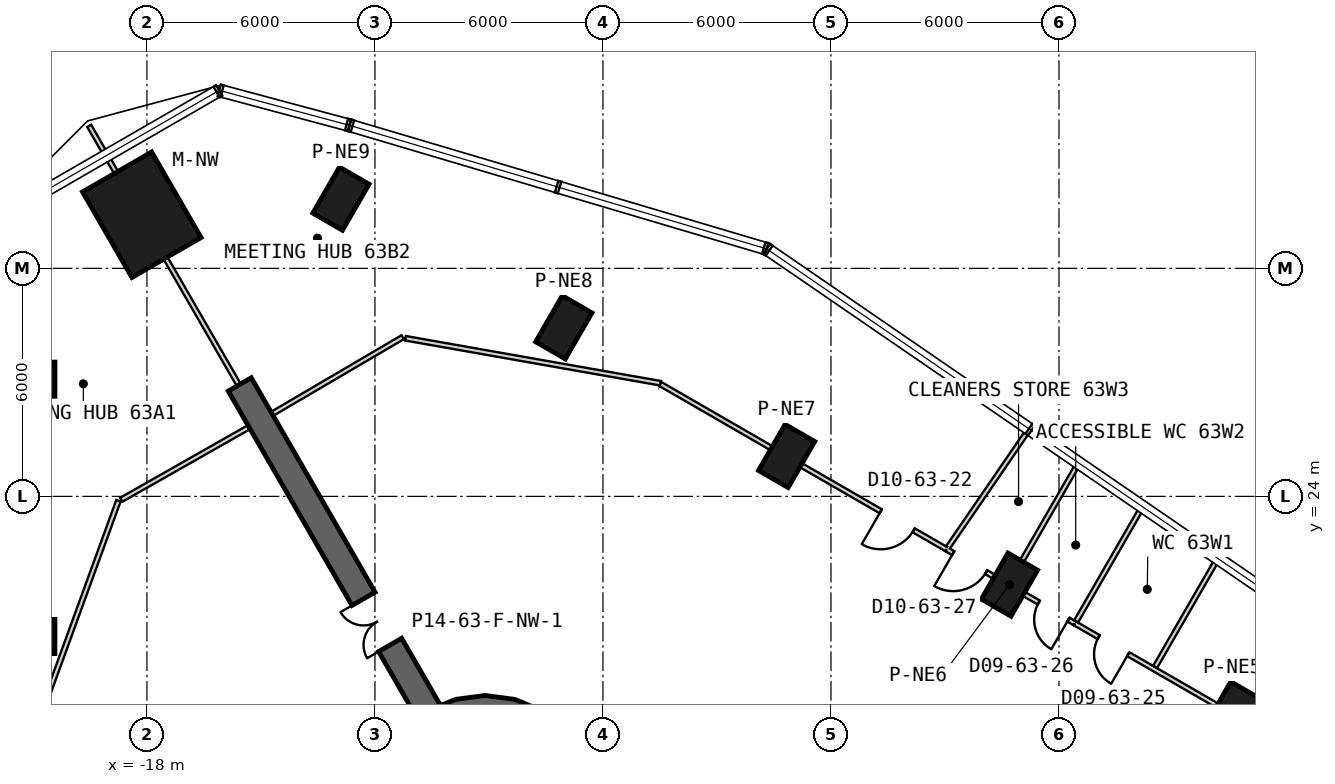
"""IFC4 building model, lengths in metres.
Left out: names, types, materials, properties, quantities, classifications, styles, units other than length and angle.
Written with IfcOpenShell. Run it as: python <this file> out.ifc"""

import sys

from ifc_helpers import new_model, si_unit, direction, frame, frame_2d, origin, origin_2d, place, context, subcontext, project, spatial, polyline, rectangle, outline, extrude, element, fill, save


model = new_model("IFC4")
c1 = context("Model", 3, precision=1e-05, world=origin(), true_north=direction((0.0, 1.0)))
c2 = subcontext(c1, "Body", "Model", "MODEL_VIEW")
j1 = project(units=[si_unit("LENGTHUNIT", "METRE"), si_unit("PLANEANGLEUNIT", "RADIAN")], contexts=[c1])
p1 = place(None, origin())
s1 = spatial("IfcSite", under=j1, at=p1, CompositionType="ELEMENT")
p2 = place(p1, origin())
s2 = spatial("IfcBuilding", under=s1, at=p2, CompositionType="ELEMENT")
p3 = place(p2, frame((0.0, 0.0, 277.2)))
s3 = spatial("IfcBuildingStorey", under=s2, at=p3, CompositionType="ELEMENT", Elevation=277.2)
p4 = place(p3, frame((-18.135, 31.411, 0.0), z_axis=(0.0, 0.0, 1.0), x_axis=(-0.5, 0.866025403784, 0.0)))
e1 = element("IfcColumn", 1, at=p4, inside=s3, PredefinedType="COLUMN", context=c2, shape_type="SweptSolid", body=[
    extrude(rectangle(XDim=2.6, YDim=2.1, at=origin_2d()), origin(), (0.0, 0.0, 1.0), 6.5),
])
for number, where, z_axis, x_axis in (
    (2, (-21.121, 27.084, 0.0), (0.0, 0.0, 1.0), (-1.0, 0.0, 0.0)),
    (3, (-21.121, 20.313, 0.0), (0.0, 0.0, 1.0), (-1.0, 0.0, 0.0)),
    (4, (10.561, 18.292, 0.0), (0.0, 0.0, 1.0), (0.5, 0.866, 0.0)),
    (5, (4.697, 21.677, 0.0), (0.0, 0.0, 1.0), (0.5, 0.866, 0.0)),
    (6, (-1.167, 25.063, 0.0), (0.0, 0.0, 1.0), (0.5, 0.866, 0.0)),
    (7, (-7.031, 28.448, 0.0), (0.0, 0.0, 1.0), (0.5, 0.866, 0.0)),
    (8, (-12.895, 31.833, 0.0), (0.0, 0.0, 1.0), (0.5, 0.866, 0.0)),
):
    element("IfcColumn", number, at=place(p3, frame(where, z_axis=z_axis, x_axis=x_axis)), inside=s3, PredefinedType="COLUMN", context=c2, shape_type="SweptSolid", body=[
        extrude(rectangle(XDim=1.4, YDim=0.9, at=origin_2d()), origin(), (0.0, 0.0, 1.0), 6.5),
    ])
p5 = place(p3, origin())
e9 = element("IfcWall", 9, at=p5, inside=s3, PredefinedType="SHEAR", context=c2, shape_type="SweptSolid", body=[
    extrude(outline(polyline([(-7.6, 18.36), (-8.323, 18.659), (-9.1, 18.762), (-9.876, 18.659), (-10.6, 18.36), (-11.221, 17.883), (-11.698, 17.262), (-11.998, 16.538), (-12.1, 15.762), (-11.2, 15.762), (-11.128, 16.305), (-10.919, 16.812), (-10.585, 17.247), (-10.15, 17.58), (-9.644, 17.79), (-9.1, 17.862), (-8.556, 17.79), (-8.05, 17.58), (-7.6, 18.36)])), origin(), (0.0, 0.0, 1.0), 6.5),
])
p6 = place(p3, frame((-10.575, 18.316, 0.0), z_axis=(0.0, 0.0, 1.0), x_axis=(-0.500007350791, 0.866021159762, 0.0)))
e10 = element("IfcWall", 10, at=p6, inside=s3, PredefinedType="SHEAR", context=c2, shape_type="SweptSolid", body=[
    extrude(rectangle(XDim=9.965, YDim=0.7, at=frame_2d((4.982, 0.0))), origin(), (0.0, 0.0, 1.0), 6.5),
])
p7 = place(p6, frame((2.05, 0.0, 0.0)))
e11 = element("IfcOpeningElement", 11, at=p7, cuts=e10, PredefinedType="OPENING", context=c2, shape_type="SweptSolid", body=[
    extrude(rectangle(XDim=1.4, YDim=2.4, at=frame_2d((0.7, 1.2))), frame((0.0, 0.36, 0.0), z_axis=(0.0, -1.0, 0.0), x_axis=(1.0, 0.0, 0.0)), (0.0, 0.0, 1.0), 0.72),
])
p8 = place(p3, frame((-18.75, 23.886, 0.0), z_axis=(0.0, 0.0, 1.0), x_axis=(-0.342042310023, -0.939684552472, 0.0)))
e12 = element("IfcWall", 12, at=p8, inside=s3, PredefinedType="PARTITIONING", context=c2, shape_type="SweptSolid", body=[
    extrude(rectangle(XDim=6.812, YDim=0.12, at=frame_2d((3.406, 0.0))), origin(), (0.0, 0.0, 1.0), 5.28),
])
p9 = place(p3, frame((-15.312, 25.822, 0.0), z_axis=(0.0, 0.0, 1.0), x_axis=(-0.869455941421, -0.494010491718, 0.0)))
e13 = element("IfcWall", 13, at=p9, inside=s3, PredefinedType="PARTITIONING", context=c2, shape_type="SweptSolid", body=[
    extrude(rectangle(XDim=3.869, YDim=0.12, at=frame_2d((1.935, 0.0))), origin(), (0.0, 0.0, 1.0), 5.28),
])
p10 = place(p3, frame((-19.52, 33.75, 0.0), z_axis=(0.0, 0.0, 1.0), x_axis=(0.50006528296, -0.865987709369, 0.0)))
e14 = element("IfcWall", 14, at=p10, inside=s3, PredefinedType="PARTITIONING", context=c2, shape_type="SweptSolid", body=[
    extrude(rectangle(XDim=1.418, YDim=0.12, at=frame_2d((0.709, 0.0))), origin(), (0.0, 0.0, 1.0), 6.1),
])
p11 = place(p3, frame((-17.511, 30.27, 0.0), z_axis=(0.0, 0.0, 1.0), x_axis=(0.499980071345, -0.866036909293, 0.0)))
e15 = element("IfcWall", 15, at=p11, inside=s3, PredefinedType="PARTITIONING", context=c2, shape_type="SweptSolid", body=[
    extrude(rectangle(XDim=3.856, YDim=0.12, at=frame_2d((1.928, 0.0))), origin(), (0.0, 0.0, 1.0), 5.67),
])
p12 = place(p3, frame((25.695, 9.529, 0.0), z_axis=(0.0, 0.0, 1.0), x_axis=(-0.866021729263, 0.500006364403, 0.0)))
e16 = element("IfcWall", 16, at=p12, inside=s3, PredefinedType="PARTITIONING", context=c2, shape_type="SweptSolid", body=[
    extrude(rectangle(XDim=22.257, YDim=0.12, at=frame_2d((11.128, 0.0))), origin(), (0.0, 0.0, 1.0), 6.1),
])
p13 = place(p12, frame((6.86, 0.0, 0.0)))
e17 = element("IfcOpeningElement", 17, at=p13, cuts=e16, PredefinedType="OPENING", context=c2, shape_type="SweptSolid", body=[
    extrude(rectangle(XDim=1.0, YDim=2.1, at=frame_2d((0.5, 1.05))), frame((0.0, 0.07, 0.0), z_axis=(0.0, -1.0, 0.0), x_axis=(1.0, 0.0, 0.0)), (0.0, 0.0, 1.0), 0.14),
])
p14 = place(p12, frame((20.637, 0.0, 0.0)))
e18 = element("IfcOpeningElement", 18, at=p14, cuts=e16, PredefinedType="OPENING", context=c2, shape_type="SweptSolid", body=[
    extrude(rectangle(XDim=0.9, YDim=2.1, at=frame_2d((0.45, 1.05))), frame((0.0, 0.07, 0.0), z_axis=(0.0, -1.0, 0.0), x_axis=(1.0, 0.0, 0.0)), (0.0, 0.0, 1.0), 0.14),
])
p15 = place(p3, frame((6.42, 20.657, 0.0), z_axis=(0.0, 0.0, 1.0), x_axis=(-0.866057323903, 0.499944708657, 0.0)))
e19 = element("IfcWall", 19, at=p15, inside=s3, PredefinedType="PARTITIONING", context=c2, shape_type="SweptSolid", body=[
    extrude(rectangle(XDim=2.029, YDim=0.12, at=frame_2d((1.014, 0.0))), origin(), (0.0, 0.0, 1.0), 6.1),
])
p16 = place(p15, frame((0.2, 0.0, 0.0)))
e20 = element("IfcOpeningElement", 20, at=p16, cuts=e19, PredefinedType="OPENING", context=c2, shape_type="SweptSolid", body=[
    extrude(rectangle(XDim=0.9, YDim=2.1, at=frame_2d((0.45, 1.05))), frame((0.0, 0.07, 0.0), z_axis=(0.0, -1.0, 0.0), x_axis=(1.0, 0.0, 0.0)), (0.0, 0.0, 1.0), 0.14),
])
p17 = place(p3, frame((4.664, 21.672, 0.0), z_axis=(0.0, 0.0, 1.0), x_axis=(-0.865988023682, 0.500064738649, 0.0)))
e21 = element("IfcWall", 21, at=p17, inside=s3, PredefinedType="PARTITIONING", context=c2, shape_type="SweptSolid", body=[
    extrude(rectangle(XDim=1.873, YDim=0.12, at=frame_2d((0.937, 0.0))), origin(), (0.0, 0.0, 1.0), 6.1),
])
p18 = place(p17, frame((0.67, 0.0, 0.0)))
e22 = element("IfcOpeningElement", 22, at=p18, cuts=e21, PredefinedType="OPENING", context=c2, shape_type="SweptSolid", body=[
    extrude(rectangle(XDim=1.0, YDim=2.1, at=frame_2d((0.5, 1.05))), frame((0.0, 0.07, 0.0), z_axis=(0.0, -1.0, 0.0), x_axis=(1.0, 0.0, 0.0)), (0.0, 0.0, 1.0), 0.14),
])
p19 = place(p3, frame((3.042, 22.608, 0.0), z_axis=(0.0, 0.0, 1.0), x_axis=(-0.866032273275, 0.499988101505, 0.0)))
e23 = element("IfcWall", 23, at=p19, inside=s3, PredefinedType="PARTITIONING", context=c2, shape_type="SweptSolid", body=[
    extrude(rectangle(XDim=8.698, YDim=0.12, at=frame_2d((4.349, 0.0))), origin(), (0.0, 0.0, 1.0), 6.1),
])
p20 = place(p19, frame((1.0, 0.0, 0.0)))
e24 = element("IfcOpeningElement", 24, at=p20, cuts=e23, PredefinedType="OPENING", context=c2, shape_type="SweptSolid", body=[
    extrude(rectangle(XDim=1.0, YDim=2.1, at=frame_2d((0.5, 1.05))), frame((0.0, 0.07, 0.0), z_axis=(0.0, -1.0, 0.0), x_axis=(1.0, 0.0, 0.0)), (0.0, 0.0, 1.0), 0.14),
])
p21 = place(p3, frame((-11.27, 28.188, 0.0), z_axis=(0.0, 0.0, 1.0), x_axis=(-0.862533821039, -0.505999414588, 0.0)))
e25 = element("IfcWall", 25, at=p21, inside=s3, PredefinedType="PARTITIONING", context=c2, shape_type="SweptSolid", body=[
    extrude(rectangle(XDim=3.984, YDim=0.12, at=frame_2d((1.992, 0.0))), origin(), (0.0, 0.0, 1.0), 5.28),
])
p22 = place(p3, frame((-4.484, 26.977, 0.0), z_axis=(0.0, 0.0, 1.0), x_axis=(-0.984808783619, 0.173642332707, 0.0)))
e26 = element("IfcWall", 26, at=p22, inside=s3, PredefinedType="PARTITIONING", context=c2, shape_type="SweptSolid", body=[
    extrude(rectangle(XDim=6.818, YDim=0.12, at=frame_2d((3.409, 0.0))), origin(), (0.0, 0.0, 1.0), 5.38),
])
p23 = place(p3, frame((10.178, 22.369, 0.0), z_axis=(0.0, 0.0, 1.0), x_axis=(-0.49998922161, -0.866031626602, 0.0)))
e27 = element("IfcWall", 27, at=p23, inside=s3, PredefinedType="PARTITIONING", context=c2, shape_type="SweptSolid", body=[
    extrude(rectangle(XDim=3.301, YDim=0.12, at=frame_2d((1.65, 0.0))), origin(), (0.0, 0.0, 1.0), 6.1),
])
p24 = place(p3, frame((3.078, 22.656, 0.0), z_axis=(0.0, 0.0, 1.0), x_axis=(0.565755533498, 0.824573026673, 0.0)))
e28 = element("IfcWall", 28, at=p24, inside=s3, PredefinedType="PARTITIONING", context=c2, shape_type="SweptSolid", body=[
    extrude(rectangle(XDim=3.78, YDim=0.12, at=frame_2d((1.89, 0.0))), origin(), (0.0, 0.0, 1.0), 6.1),
])
p25 = place(p3, frame((8.194, 23.73, 0.0), z_axis=(0.0, 0.0, 1.0), x_axis=(-0.500001179632, -0.866024722723, 0.0)))
e29 = element("IfcWall", 29, at=p25, inside=s3, PredefinedType="PARTITIONING", context=c2, shape_type="SweptSolid", body=[
    extrude(rectangle(XDim=3.488, YDim=0.12, at=frame_2d((1.744, 0.0))), origin(), (0.0, 0.0, 1.0), 6.1),
])
p26 = place(p3, frame((6.516, 24.881, 0.0), z_axis=(0.0, 0.0, 1.0), x_axis=(-0.499956253286, -0.866050659489, 0.0)))
e30 = element("IfcWall", 30, at=p26, inside=s3, PredefinedType="PARTITIONING", context=c2, shape_type="SweptSolid", body=[
    extrude(rectangle(XDim=3.646, YDim=0.12, at=frame_2d((1.823, 0.0))), origin(), (0.0, 0.0, 1.0), 6.1),
])
p27 = place(p20, origin())
e31 = element("IfcDoor", 31, at=p27, inside=s3, OperationType="SINGLE_SWING_RIGHT", PredefinedType="NOTDEFINED", context=c2, shape_type="SweptSolid", body=[
    extrude(rectangle(XDim=1.0, YDim=2.1, at=frame_2d((0.5, 1.05))), frame((0.0, 0.025, 0.0), z_axis=(0.0, -1.0, 0.0), x_axis=(1.0, 0.0, 0.0)), (0.0, 0.0, 1.0), 0.05),
])
fill(e24, e31)
p28 = place(p14, origin())
e32 = element("IfcDoor", 32, at=p28, inside=s3, OperationType="SINGLE_SWING_LEFT", PredefinedType="NOTDEFINED", context=c2, shape_type="SweptSolid", body=[
    extrude(rectangle(XDim=0.9, YDim=2.1, at=frame_2d((0.45, 1.05))), frame((0.0, 0.025, 0.0), z_axis=(0.0, -1.0, 0.0), x_axis=(1.0, 0.0, 0.0)), (0.0, 0.0, 1.0), 0.05),
])
fill(e18, e32)
p29 = place(p16, origin())
e33 = element("IfcDoor", 33, at=p29, inside=s3, OperationType="SINGLE_SWING_LEFT", PredefinedType="NOTDEFINED", context=c2, shape_type="SweptSolid", body=[
    extrude(rectangle(XDim=0.9, YDim=2.1, at=frame_2d((0.45, 1.05))), frame((0.0, 0.025, 0.0), z_axis=(0.0, -1.0, 0.0), x_axis=(1.0, 0.0, 0.0)), (0.0, 0.0, 1.0), 0.05),
])
fill(e20, e33)
p30 = place(p18, origin())
e34 = element("IfcDoor", 34, at=p30, inside=s3, OperationType="SINGLE_SWING_RIGHT", PredefinedType="NOTDEFINED", context=c2, shape_type="SweptSolid", body=[
    extrude(rectangle(XDim=1.0, YDim=2.1, at=frame_2d((0.5, 1.05))), frame((0.0, 0.025, 0.0), z_axis=(0.0, -1.0, 0.0), x_axis=(1.0, 0.0, 0.0)), (0.0, 0.0, 1.0), 0.05),
])
fill(e22, e34)
p31 = place(p7, origin())
e35 = element("IfcDoor", 35, at=p31, inside=s3, OperationType="DOUBLE_DOOR_SINGLE_SWING", PredefinedType="NOTDEFINED", context=c2, shape_type="SweptSolid", body=[
    extrude(rectangle(XDim=1.4, YDim=2.4, at=frame_2d((0.7, 1.2))), frame((0.0, 0.025, 0.0), z_axis=(0.0, -1.0, 0.0), x_axis=(1.0, 0.0, 0.0)), (0.0, 0.0, 1.0), 0.05),
])
fill(e11, e35)
save(model, sys.argv[1])
